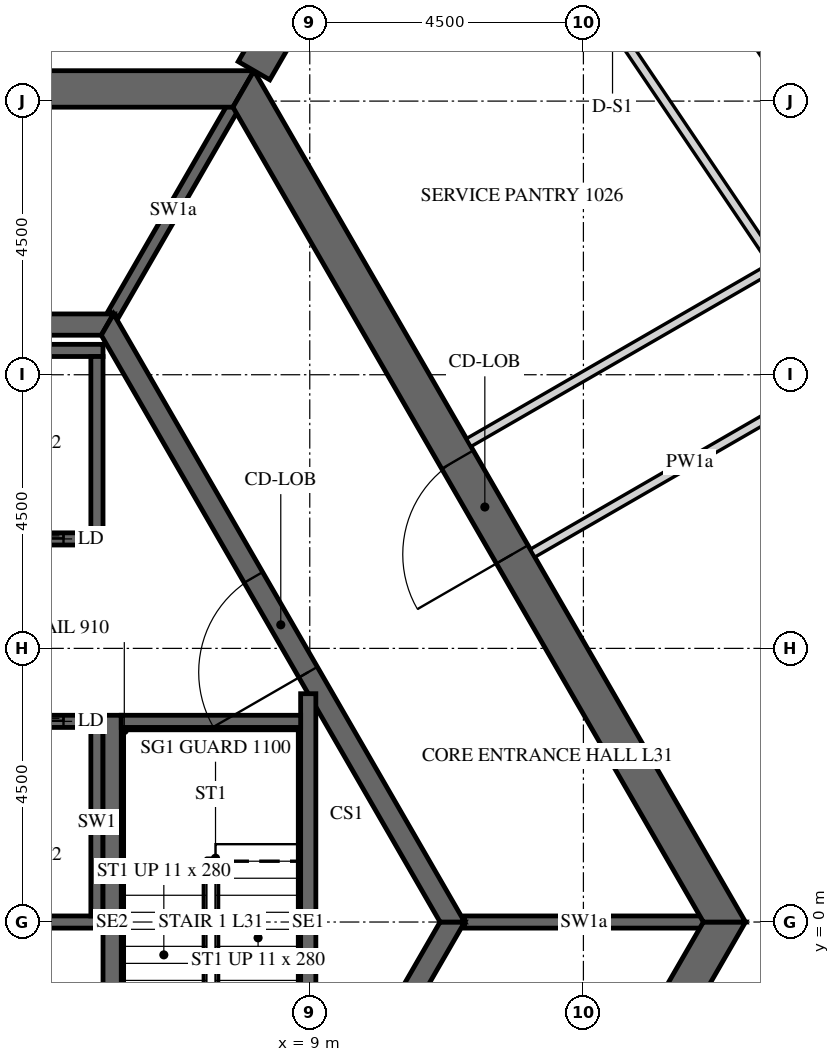
"""IFC4 building model, lengths in metres.
Left out: names, types, materials, properties, quantities, classifications, styles, units other than length and angle.
Written with IfcOpenShell. Run it as: python <this file> out.ifc"""

import sys

from ifc_helpers import new_model, si_unit, direction, frame, frame_2d, origin, place, context, subcontext, project, spatial, polyline, rectangle, outline, extrude, element, fill, save


model = new_model("IFC4")
c1 = context("Model", 3, precision=1e-05, world=origin(), true_north=direction((0.0, 1.0)))
c2 = subcontext(c1, "Body", "Model", "MODEL_VIEW")
j1 = project(units=[si_unit("LENGTHUNIT", "METRE"), si_unit("PLANEANGLEUNIT", "RADIAN")], contexts=[c1])
p1 = place(None, origin())
s1 = spatial("IfcSite", under=j1, at=p1, CompositionType="ELEMENT")
p2 = place(p1, origin())
s2 = spatial("IfcBuilding", under=s1, at=p2, CompositionType="ELEMENT")
p3 = place(p2, frame((0.0, 0.0, 135.0)))
s3 = spatial("IfcBuildingStorey", under=s2, at=p3, CompositionType="ELEMENT", Elevation=135.0)
p4 = place(p3, frame((7.91, -13.7, -0.15), z_axis=(0.0, 0.0, 1.0), x_axis=(0.499999880136, 0.866025472988, 0.0)))
e1 = element("IfcWall", 1, at=p4, inside=s3, PredefinedType="SHEAR", context=c2, shape_type="SweptSolid", body=[
    extrude(outline(polyline([(-0.173, -0.3), (15.993, -0.3), (15.646, 0.3), (0.173, 0.3), (-0.173, -0.3)])), origin(), (0.0, 0.0, 1.0), 3.9),
])
p5 = place(p4, frame((7.039, 0.0, 0.15)))
e2 = element("IfcOpeningElement", 2, at=p5, cuts=e1, PredefinedType="OPENING", context=c2, shape_type="SweptSolid", body=[
    extrude(rectangle(XDim=1.8, YDim=2.4, at=frame_2d((0.9, 1.2))), frame((0.0, 0.31, 0.0), z_axis=(0.0, -1.0, 0.0), x_axis=(1.0, 0.0, 0.0)), (0.0, 0.0, 1.0), 0.62),
])
p6 = place(p3, frame((15.819, 0.0, -0.15), z_axis=(0.0, 0.0, 1.0), x_axis=(-0.499999880136, 0.866025472988, 0.0)))
e3 = element("IfcWall", 3, at=p6, inside=s3, PredefinedType="SHEAR", context=c2, shape_type="SweptSolid", body=[
    extrude(outline(polyline([(-0.173, -0.3), (15.993, -0.3), (15.646, 0.3), (0.173, 0.3), (-0.173, -0.3)])), origin(), (0.0, 0.0, 1.0), 3.9),
])
p7 = place(p6, frame((6.981, 0.0, 0.15)))
e4 = element("IfcOpeningElement", 4, at=p7, cuts=e3, PredefinedType="OPENING", context=c2, shape_type="SweptSolid", body=[
    extrude(rectangle(XDim=1.8, YDim=2.4, at=frame_2d((0.9, 1.2))), frame((0.0, 0.31, 0.0), z_axis=(0.0, -1.0, 0.0), x_axis=(1.0, 0.0, 0.0)), (0.0, 0.0, 1.0), 0.62),
])
p8 = place(p3, frame((7.91, 13.7, -0.15), z_axis=(0.0, 0.0, 1.0), x_axis=(-1.0, 0.0, 0.0)))
e5 = element("IfcWall", 5, at=p8, inside=s3, PredefinedType="SHEAR", context=c2, shape_type="SweptSolid", body=[
    extrude(outline(polyline([(-0.173, -0.3), (15.993, -0.3), (15.646, 0.3), (0.173, 0.3), (-0.173, -0.3)])), origin(), (0.0, 0.0, 1.0), 3.9),
])
p9 = place(p8, frame((7.31, 0.0, 0.15)))
e6 = element("IfcOpeningElement", 6, at=p9, cuts=e5, PredefinedType="OPENING", context=c2, shape_type="SweptSolid", body=[
    extrude(rectangle(XDim=1.2, YDim=2.4, at=frame_2d((0.6, 1.2))), frame((0.0, 0.31, 0.0), z_axis=(0.0, -1.0, 0.0), x_axis=(1.0, 0.0, 0.0)), (0.0, 0.0, 1.0), 0.62),
])
p10 = place(p3, frame((8.083, 14.0, -0.15), z_axis=(0.0, 0.0, 1.0), x_axis=(0.499997680643, 0.866026742862, 0.0)))
e7 = element("IfcWall", 7, at=p10, inside=s3, PredefinedType="SHEAR", context=c2, shape_type="SweptSolid", body=[
    extrude(rectangle(XDim=16.509, YDim=0.6, at=frame_2d((8.254, 0.0))), origin(), (0.0, 0.0, 1.0), 3.9),
])
p11 = place(p10, frame((7.354, 0.0, 0.15)))
e8 = element("IfcOpeningElement", 8, at=p11, cuts=e7, PredefinedType="OPENING", context=c2, shape_type="SweptSolid", body=[
    extrude(rectangle(XDim=1.8, YDim=2.4, at=frame_2d((0.9, 1.2))), frame((0.0, 0.31, 0.0), z_axis=(0.0, -1.0, 0.0), x_axis=(1.0, 0.0, 0.0)), (0.0, 0.0, 1.0), 0.62),
])
p12 = place(p3, frame((5.673, -9.825, -0.15), z_axis=(0.0, 0.0, 1.0), x_axis=(0.499995046907, 0.866028263435, 0.0)))
e9 = element("IfcWall", 9, at=p12, inside=s3, PredefinedType="SHEAR", context=c2, shape_type="SweptSolid", body=[
    extrude(outline(polyline([(-0.101, -0.175), (11.446, -0.175), (11.244, 0.175), (0.101, 0.175), (-0.101, -0.175)])), origin(), (0.0, 0.0, 1.0), 3.9),
])
p13 = place(p12, frame((4.801, 0.0, 0.15)))
e10 = element("IfcOpeningElement", 10, at=p13, cuts=e9, PredefinedType="OPENING", context=c2, shape_type="SweptSolid", body=[
    extrude(rectangle(XDim=1.8, YDim=2.4, at=frame_2d((0.9, 1.2))), frame((0.0, 0.185, 0.0), z_axis=(0.0, -1.0, 0.0), x_axis=(1.0, 0.0, 0.0)), (0.0, 0.0, 1.0), 0.37),
])
p14 = place(p3, frame((11.345, 0.0, -0.15), z_axis=(0.0, 0.0, 1.0), x_axis=(-0.499995046907, 0.866028263435, 0.0)))
e11 = element("IfcWall", 11, at=p14, inside=s3, PredefinedType="SHEAR", context=c2, shape_type="SweptSolid", body=[
    extrude(outline(polyline([(-0.101, -0.175), (11.446, -0.175), (11.244, 0.175), (0.101, 0.175), (-0.101, -0.175)])), origin(), (0.0, 0.0, 1.0), 3.9),
])
p15 = place(p14, frame((4.744, 0.0, 0.15)))
e12 = element("IfcOpeningElement", 12, at=p15, cuts=e11, PredefinedType="OPENING", context=c2, shape_type="SweptSolid", body=[
    extrude(rectangle(XDim=1.8, YDim=2.4, at=frame_2d((0.9, 1.2))), frame((0.0, 0.185, 0.0), z_axis=(0.0, -1.0, 0.0), x_axis=(1.0, 0.0, 0.0)), (0.0, 0.0, 1.0), 0.37),
])
p16 = place(p3, frame((5.673, 9.825, -0.15), z_axis=(0.0, 0.0, 1.0), x_axis=(-1.0, 0.0, 0.0)))
e13 = element("IfcWall", 13, at=p16, inside=s3, PredefinedType="SHEAR", context=c2, shape_type="SweptSolid", body=[
    extrude(outline(polyline([(-0.101, -0.175), (11.446, -0.175), (11.244, 0.175), (0.101, 0.175), (-0.101, -0.175)])), origin(), (0.0, 0.0, 1.0), 3.9),
])
p17 = place(p3, frame((-5.6, 6.3, -0.25), z_axis=(0.0, 0.0, 1.0), x_axis=(1.0, 0.0, 0.0)))
e14 = element("IfcWall", 14, at=p17, inside=s3, PredefinedType="SHEAR", context=c2, shape_type="SweptSolid", body=[
    extrude(rectangle(XDim=11.2, YDim=0.2, at=frame_2d((5.6, 0.0))), origin(), (0.0, 0.0, 1.0), 3.9),
])
p18 = place(p17, frame((0.65, 0.0, 0.25)))
e15 = element("IfcOpeningElement", 15, at=p18, cuts=e14, PredefinedType="OPENING", context=c2, shape_type="SweptSolid", body=[
    extrude(rectangle(XDim=1.1, YDim=2.1, at=frame_2d((0.55, 1.05))), frame((0.0, 0.11, 0.0), z_axis=(0.0, -1.0, 0.0), x_axis=(1.0, 0.0, 0.0)), (0.0, 0.0, 1.0), 0.22),
])
p19 = place(p17, frame((2.85, 0.0, 0.25)))
e16 = element("IfcOpeningElement", 16, at=p19, cuts=e14, PredefinedType="OPENING", context=c2, shape_type="SweptSolid", body=[
    extrude(rectangle(XDim=1.1, YDim=2.1, at=frame_2d((0.55, 1.05))), frame((0.0, 0.11, 0.0), z_axis=(0.0, -1.0, 0.0), x_axis=(1.0, 0.0, 0.0)), (0.0, 0.0, 1.0), 0.22),
])
p20 = place(p17, frame((5.05, 0.0, 0.25)))
e17 = element("IfcOpeningElement", 17, at=p20, cuts=e14, PredefinedType="OPENING", context=c2, shape_type="SweptSolid", body=[
    extrude(rectangle(XDim=1.1, YDim=2.1, at=frame_2d((0.55, 1.05))), frame((0.0, 0.11, 0.0), z_axis=(0.0, -1.0, 0.0), x_axis=(1.0, 0.0, 0.0)), (0.0, 0.0, 1.0), 0.22),
])
p21 = place(p17, frame((7.25, 0.0, 0.25)))
e18 = element("IfcOpeningElement", 18, at=p21, cuts=e14, PredefinedType="OPENING", context=c2, shape_type="SweptSolid", body=[
    extrude(rectangle(XDim=1.1, YDim=2.1, at=frame_2d((0.55, 1.05))), frame((0.0, 0.11, 0.0), z_axis=(0.0, -1.0, 0.0), x_axis=(1.0, 0.0, 0.0)), (0.0, 0.0, 1.0), 0.22),
])
p22 = place(p17, frame((9.45, 0.0, 0.25)))
e19 = element("IfcOpeningElement", 19, at=p22, cuts=e14, PredefinedType="OPENING", context=c2, shape_type="SweptSolid", body=[
    extrude(rectangle(XDim=1.1, YDim=2.1, at=frame_2d((0.55, 1.05))), frame((0.0, 0.11, 0.0), z_axis=(0.0, -1.0, 0.0), x_axis=(1.0, 0.0, 0.0)), (0.0, 0.0, 1.0), 0.22),
])
p23 = place(p3, frame((-5.6, 9.4, -0.25), z_axis=(0.0, 0.0, 1.0), x_axis=(1.0, 0.0, 0.0)))
e20 = element("IfcWall", 20, at=p23, inside=s3, PredefinedType="SHEAR", context=c2, shape_type="SweptSolid", body=[
    extrude(rectangle(XDim=11.2, YDim=0.2, at=frame_2d((5.6, 0.0))), origin(), (0.0, 0.0, 1.0), 3.9),
])
p24 = place(p3, frame((5.5, 6.4, -0.25), z_axis=(0.0, 0.0, 1.0), x_axis=(0.0, 1.0, 0.0)))
e21 = element("IfcWall", 21, at=p24, inside=s3, PredefinedType="SHEAR", context=c2, shape_type="SweptSolid", body=[
    extrude(rectangle(XDim=2.9, YDim=0.2, at=frame_2d((1.45, 0.0))), origin(), (0.0, 0.0, 1.0), 3.9),
])
p25 = place(p3, frame((-5.6, 3.3, -0.25), z_axis=(0.0, 0.0, 1.0), x_axis=(1.0, 0.0, 0.0)))
e22 = element("IfcWall", 22, at=p25, inside=s3, PredefinedType="SHEAR", context=c2, shape_type="SweptSolid", body=[
    extrude(rectangle(XDim=11.2, YDim=0.2, at=frame_2d((5.6, 0.0))), origin(), (0.0, 0.0, 1.0), 3.9),
])
p26 = place(p25, frame((0.65, 0.0, 0.25)))
e23 = element("IfcOpeningElement", 23, at=p26, cuts=e22, PredefinedType="OPENING", context=c2, shape_type="SweptSolid", body=[
    extrude(rectangle(XDim=1.1, YDim=2.1, at=frame_2d((0.55, 1.05))), frame((0.0, 0.11, 0.0), z_axis=(0.0, -1.0, 0.0), x_axis=(1.0, 0.0, 0.0)), (0.0, 0.0, 1.0), 0.22),
])
p27 = place(p25, frame((2.85, 0.0, 0.25)))
e24 = element("IfcOpeningElement", 24, at=p27, cuts=e22, PredefinedType="OPENING", context=c2, shape_type="SweptSolid", body=[
    extrude(rectangle(XDim=1.1, YDim=2.1, at=frame_2d((0.55, 1.05))), frame((0.0, 0.11, 0.0), z_axis=(0.0, -1.0, 0.0), x_axis=(1.0, 0.0, 0.0)), (0.0, 0.0, 1.0), 0.22),
])
p28 = place(p25, frame((5.05, 0.0, 0.25)))
e25 = element("IfcOpeningElement", 25, at=p28, cuts=e22, PredefinedType="OPENING", context=c2, shape_type="SweptSolid", body=[
    extrude(rectangle(XDim=1.1, YDim=2.1, at=frame_2d((0.55, 1.05))), frame((0.0, 0.11, 0.0), z_axis=(0.0, -1.0, 0.0), x_axis=(1.0, 0.0, 0.0)), (0.0, 0.0, 1.0), 0.22),
])
p29 = place(p25, frame((7.25, 0.0, 0.25)))
e26 = element("IfcOpeningElement", 26, at=p29, cuts=e22, PredefinedType="OPENING", context=c2, shape_type="SweptSolid", body=[
    extrude(rectangle(XDim=1.1, YDim=2.1, at=frame_2d((0.55, 1.05))), frame((0.0, 0.11, 0.0), z_axis=(0.0, -1.0, 0.0), x_axis=(1.0, 0.0, 0.0)), (0.0, 0.0, 1.0), 0.22),
])
p30 = place(p25, frame((9.45, 0.0, 0.25)))
e27 = element("IfcOpeningElement", 27, at=p30, cuts=e22, PredefinedType="OPENING", context=c2, shape_type="SweptSolid", body=[
    extrude(rectangle(XDim=1.1, YDim=2.1, at=frame_2d((0.55, 1.05))), frame((0.0, 0.11, 0.0), z_axis=(0.0, -1.0, 0.0), x_axis=(1.0, 0.0, 0.0)), (0.0, 0.0, 1.0), 0.22),
])
p31 = place(p3, frame((-5.6, 0.0, -0.25), z_axis=(0.0, 0.0, 1.0), x_axis=(1.0, 0.0, 0.0)))
e28 = element("IfcWall", 28, at=p31, inside=s3, PredefinedType="SHEAR", context=c2, shape_type="SweptSolid", body=[
    extrude(rectangle(XDim=11.2, YDim=0.2, at=frame_2d((5.6, 0.0))), origin(), (0.0, 0.0, 1.0), 3.9),
])
p32 = place(p3, frame((5.5, 0.1, -0.25), z_axis=(0.0, 0.0, 1.0), x_axis=(0.0, 1.0, 0.0)))
e29 = element("IfcWall", 29, at=p32, inside=s3, PredefinedType="SHEAR", context=c2, shape_type="SweptSolid", body=[
    extrude(rectangle(XDim=3.1, YDim=0.2, at=frame_2d((1.55, 0.0))), origin(), (0.0, 0.0, 1.0), 3.9),
])
p33 = place(p3, frame((11.547, 0.0, -0.15), z_axis=(0.0, 0.0, 1.0), x_axis=(1.0, 0.0, 0.0)))
e30 = element("IfcWall", 30, at=p33, inside=s3, PredefinedType="SHEAR", context=c2, shape_type="SweptSolid", body=[
    extrude(rectangle(XDim=3.926, YDim=0.2, at=frame_2d((1.963, 0.0))), origin(), (0.0, 0.0, 1.0), 3.9),
])
p34 = place(p3, frame((5.773, 10.0, -0.15), z_axis=(0.0, 0.0, 1.0), x_axis=(0.500038251005, 0.86600331843, 0.0)))
e31 = element("IfcWall", 31, at=p34, inside=s3, PredefinedType="SHEAR", context=c2, shape_type="SweptSolid", body=[
    extrude(rectangle(XDim=3.926, YDim=0.2, at=frame_2d((1.963, 0.0))), origin(), (0.0, 0.0, 1.0), 3.9),
])
p35 = place(p3, frame((5.75, -3.4, -0.25), z_axis=(0.0, 0.0, 1.0), x_axis=(0.0, 1.0, 0.0)))
e32 = element("IfcWall", 32, at=p35, inside=s3, PredefinedType="SHEAR", context=c2, shape_type="SweptSolid", body=[
    extrude(rectangle(XDim=6.8, YDim=0.3, at=frame_2d((3.4, 0.0))), origin(), (0.0, 0.0, 1.0), 3.9),
])
p36 = place(p3, frame((8.975, -3.755, -0.25), z_axis=(0.0, 0.0, 1.0), x_axis=(0.0, 1.0, 0.0)))
e33 = element("IfcWall", 33, at=p36, inside=s3, PredefinedType="SHEAR", context=c2, shape_type="SweptSolid", body=[
    extrude(rectangle(XDim=7.51, YDim=0.25, at=frame_2d((3.755, 0.0))), origin(), (0.0, 0.0, 1.0), 3.9),
])
p37 = place(p3, frame((5.9, 3.3, -0.25), z_axis=(0.0, 0.0, 1.0), x_axis=(1.0, 0.0, 0.0)))
e34 = element("IfcWall", 34, at=p37, inside=s3, PredefinedType="SHEAR", context=c2, shape_type="SweptSolid", body=[
    extrude(rectangle(XDim=2.95, YDim=0.2, at=frame_2d((1.475, 0.0))), origin(), (0.0, 0.0, 1.0), 3.9),
])
p38 = place(p3, frame((13.755, -19.475, 0.0), z_axis=(0.0, 0.0, 1.0), x_axis=(0.50000013933, 0.866025323342, 0.0)))
e35 = element("IfcWall", 35, at=p38, inside=s3, PredefinedType="PARTITIONING", context=c2, shape_type="SweptSolid", body=[
    extrude(rectangle(XDim=23.517, YDim=0.15, at=frame_2d((11.758, 0.0))), origin(), (0.0, 0.0, 1.0), 2.838),
])
p39 = place(p38, frame((4.456, 0.0, 0.0)))
e36 = element("IfcOpeningElement", 36, at=p39, cuts=e35, PredefinedType="OPENING", context=c2, shape_type="SweptSolid", body=[
    extrude(rectangle(XDim=1.0, YDim=2.1, at=frame_2d((0.5, 1.05))), frame((0.0, 0.085, 0.0), z_axis=(0.0, -1.0, 0.0), x_axis=(1.0, 0.0, 0.0)), (0.0, 0.0, 1.0), 0.17),
])
p40 = place(p38, frame((13.699, 0.0, 0.0)))
e37 = element("IfcOpeningElement", 37, at=p40, cuts=e35, PredefinedType="OPENING", context=c2, shape_type="SweptSolid", body=[
    extrude(rectangle(XDim=1.0, YDim=2.1, at=frame_2d((0.5, 1.05))), frame((0.0, 0.085, 0.0), z_axis=(0.0, -1.0, 0.0), x_axis=(1.0, 0.0, 0.0)), (0.0, 0.0, 1.0), 0.17),
])
p41 = place(p38, frame((21.658, 0.0, 0.0)))
e38 = element("IfcOpeningElement", 38, at=p41, cuts=e35, PredefinedType="OPENING", context=c2, shape_type="SweptSolid", body=[
    extrude(rectangle(XDim=1.0, YDim=2.1, at=frame_2d((0.5, 1.05))), frame((0.0, 0.085, 0.0), z_axis=(0.0, -1.0, 0.0), x_axis=(1.0, 0.0, 0.0)), (0.0, 0.0, 1.0), 0.17),
])
p42 = place(p3, frame((25.467, 0.96, 0.0), z_axis=(0.0, 0.0, 1.0), x_axis=(-0.559200743185, 0.829032284547, 0.0)))
e39 = element("IfcWall", 39, at=p42, inside=s3, PredefinedType="PARTITIONING", context=c2, shape_type="SweptSolid", body=[
    extrude(rectangle(XDim=21.668, YDim=0.15, at=frame_2d((10.834, 0.0))), origin(), (0.0, 0.0, 1.0), 2.838),
])
p43 = place(p42, frame((10.434, 0.0, 0.0)))
e40 = element("IfcOpeningElement", 40, at=p43, cuts=e39, PredefinedType="OPENING", context=c2, shape_type="SweptSolid", body=[
    extrude(rectangle(XDim=1.0, YDim=2.1, at=frame_2d((0.5, 1.05))), frame((0.0, 0.085, 0.0), z_axis=(0.0, -1.0, 0.0), x_axis=(1.0, 0.0, 0.0)), (0.0, 0.0, 1.0), 0.17),
])
p44 = place(p3, frame((12.664, 6.066, 0.0), z_axis=(0.0, 0.0, 1.0), x_axis=(0.866018848283, 0.500011354289, 0.0)))
e41 = element("IfcWall", 41, at=p44, inside=s3, PredefinedType="PARTITIONING", context=c2, shape_type="SweptSolid", body=[
    extrude(rectangle(XDim=5.974, YDim=0.15, at=frame_2d((2.987, 0.0))), origin(), (0.0, 0.0, 1.0), 2.838),
])
p45 = place(p3, frame((11.298, 18.748, 0.0), z_axis=(0.0, 0.0, 1.0), x_axis=(0.559198234291, -0.829033976847, 0.0)))
e42 = element("IfcWall", 42, at=p45, inside=s3, PredefinedType="PARTITIONING", context=c2, shape_type="SweptSolid", body=[
    extrude(rectangle(XDim=9.59, YDim=0.15, at=frame_2d((4.795, 0.0))), origin(), (0.0, 0.0, 1.0), 2.838),
])
p46 = place(p45, frame((4.345, 0.0, 0.0)))
e43 = element("IfcOpeningElement", 43, at=p46, cuts=e42, PredefinedType="OPENING", context=c2, shape_type="SweptSolid", body=[
    extrude(rectangle(XDim=0.9, YDim=2.1, at=frame_2d((0.45, 1.05))), frame((0.0, 0.085, 0.0), z_axis=(0.0, -1.0, 0.0), x_axis=(1.0, 0.0, 0.0)), (0.0, 0.0, 1.0), 0.17),
])
p47 = place(p3, frame((16.595, 10.76, 0.0), z_axis=(0.0, 0.0, 1.0), x_axis=(-0.866019477104, -0.500010265171, 0.0)))
e44 = element("IfcWall", 44, at=p47, inside=s3, PredefinedType="PARTITIONING", context=c2, shape_type="SweptSolid", body=[
    extrude(rectangle(XDim=5.752, YDim=0.15, at=frame_2d((2.876, 0.0))), origin(), (0.0, 0.0, 1.0), 2.838),
])
p48 = place(p7, origin())
e45 = element("IfcDoor", 45, at=p48, inside=s3, OperationType="DOUBLE_DOOR_SINGLE_SWING", PredefinedType="DOOR", context=c2, shape_type="SweptSolid", body=[
    extrude(rectangle(XDim=1.8, YDim=2.4, at=frame_2d((0.9, 1.2))), frame((0.0, 0.025, 0.0), z_axis=(0.0, -1.0, 0.0), x_axis=(1.0, 0.0, 0.0)), (0.0, 0.0, 1.0), 0.05),
])
fill(e4, e45)
p49 = place(p15, origin())
e46 = element("IfcDoor", 46, at=p49, inside=s3, OperationType="DOUBLE_DOOR_SINGLE_SWING", PredefinedType="DOOR", context=c2, shape_type="SweptSolid", body=[
    extrude(rectangle(XDim=1.8, YDim=2.4, at=frame_2d((0.9, 1.2))), frame((0.0, 0.025, 0.0), z_axis=(0.0, -1.0, 0.0), x_axis=(1.0, 0.0, 0.0)), (0.0, 0.0, 1.0), 0.05),
])
fill(e12, e46)
p50 = place(p22, origin())
e47 = element("IfcDoor", 47, at=p50, inside=s3, OperationType="SLIDING_TO_LEFT", PredefinedType="DOOR", context=c2, shape_type="SweptSolid", body=[
    extrude(rectangle(XDim=1.1, YDim=2.1, at=frame_2d((0.55, 1.05))), frame((0.0, 0.025, 0.0), z_axis=(0.0, -1.0, 0.0), x_axis=(1.0, 0.0, 0.0)), (0.0, 0.0, 1.0), 0.05),
])
fill(e19, e47)
p51 = place(p30, origin())
e48 = element("IfcDoor", 48, at=p51, inside=s3, OperationType="SLIDING_TO_LEFT", PredefinedType="DOOR", context=c2, shape_type="SweptSolid", body=[
    extrude(rectangle(XDim=1.1, YDim=2.1, at=frame_2d((0.55, 1.05))), frame((0.0, 0.025, 0.0), z_axis=(0.0, -1.0, 0.0), x_axis=(1.0, 0.0, 0.0)), (0.0, 0.0, 1.0), 0.05),
])
fill(e27, e48)
save(model, sys.argv[1])
